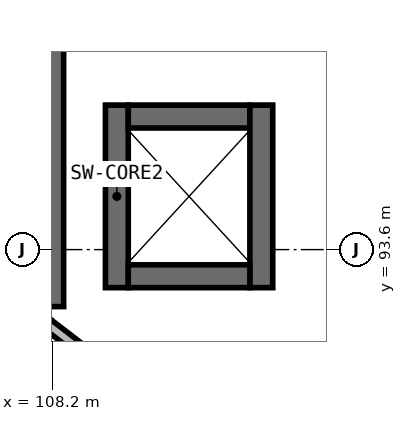
"""IFC4 building model, lengths in metres.
Left out: names, types, materials, properties, quantities, classifications, styles, units other than length and angle.
Written with IfcOpenShell. Run it as: python <this file> out.ifc"""

import sys

from ifc_helpers import new_model, si_unit, direction, frame, frame_2d, origin, place, context, subcontext, project, spatial, rectangle, extrude, element, save


model = new_model("IFC4")
c1 = context("Model", 3, precision=1e-05, world=origin(), true_north=direction((0.0, 1.0)))
c2 = subcontext(c1, "Body", "Model", "MODEL_VIEW")
j1 = project(units=[si_unit("LENGTHUNIT", "METRE"), si_unit("PLANEANGLEUNIT", "RADIAN")], contexts=[c1])
p1 = place(None, origin())
s1 = spatial("IfcSite", under=j1, at=p1, CompositionType="ELEMENT")
p2 = place(p1, origin())
s2 = spatial("IfcBuilding", under=s1, at=p2, CompositionType="ELEMENT")
p3 = place(p2, frame((0.0, 0.0, 18.9)))
s3 = spatial("IfcBuildingStorey", under=s2, at=p3, CompositionType="ELEMENT", Elevation=18.9)
p4 = place(p3, frame((108.175, 96.55, 0.0), z_axis=(0.0, 0.0, 1.0), x_axis=(0.0, -1.0, 0.0)))
e1 = element("IfcWall", 1, at=p4, inside=s3, PredefinedType="SHEAR", context=c2, shape_type="SweptSolid", body=[
    extrude(rectangle(XDim=3.7, YDim=0.35, at=frame_2d((1.85, 0.0))), origin(), (0.0, 0.0, 1.0), 4.55),
])
p5 = place(p3, frame((109.05, 93.1, 0.0), z_axis=(0.0, 0.0, 1.0), x_axis=(0.0, 1.0, 0.0)))
e2 = element("IfcWall", 2, at=p5, inside=s3, PredefinedType="SHEAR", context=c2, shape_type="SweptSolid", body=[
    extrude(rectangle(XDim=2.4, YDim=0.3, at=frame_2d((1.2, 0.0))), origin(), (0.0, 0.0, 1.0), 4.37),
])
p6 = place(p3, frame((109.2, 95.35, 0.0), z_axis=(0.0, 0.0, 1.0), x_axis=(1.0, 0.0, 0.0)))
e3 = element("IfcWall", 3, at=p6, inside=s3, PredefinedType="SHEAR", context=c2, shape_type="SweptSolid", body=[
    extrude(rectangle(XDim=1.6, YDim=0.3, at=frame_2d((0.8, 0.0))), origin(), (0.0, 0.0, 1.0), 4.37),
])
p7 = place(p3, frame((110.95, 95.5, 0.0), z_axis=(0.0, 0.0, 1.0), x_axis=(0.0, -1.0, 0.0)))
e4 = element("IfcWall", 4, at=p7, inside=s3, PredefinedType="SHEAR", context=c2, shape_type="SweptSolid", body=[
    extrude(rectangle(XDim=2.4, YDim=0.3, at=frame_2d((1.2, 0.0))), origin(), (0.0, 0.0, 1.0), 4.37),
])
p8 = place(p3, frame((110.8, 93.25, 0.0), z_axis=(0.0, 0.0, 1.0), x_axis=(-1.0, 0.0, 0.0)))
e5 = element("IfcWall", 5, at=p8, inside=s3, PredefinedType="SHEAR", context=c2, shape_type="SweptSolid", body=[
    extrude(rectangle(XDim=1.6, YDim=0.3, at=frame_2d((0.8, 0.0))), origin(), (0.0, 0.0, 1.0), 4.37),
])
p9 = place(p3, frame((111.675, 98.726, 0.0), z_axis=(0.0, 0.0, 1.0), x_axis=(0.79334001117, -0.608778799465, 0.0)))
e6 = element("IfcWall", 6, at=p9, inside=s3, PredefinedType="SOLIDWALL", context=c2, shape_type="SweptSolid", body=[
    extrude(rectangle(XDim=12.868, YDim=0.29, at=frame_2d((6.434, 0.0))), origin(), (0.0, 0.0, 1.0), 3.754),
])
p10 = place(p9, frame((2.087, 0.0, 0.95)))
e7 = element("IfcOpeningElement", 7, at=p10, cuts=e6, PredefinedType="OPENING", context=c2, shape_type="SweptSolid", body=[
    extrude(rectangle(XDim=2.26, YDim=1.65, at=frame_2d((1.13, 0.825))), frame((0.0, 0.155, 0.0), z_axis=(0.0, -1.0, 0.0), x_axis=(1.0, 0.0, 0.0)), (0.0, 0.0, 1.0), 0.31),
])
p11 = place(p9, frame((8.521, 0.0, 0.95)))
e8 = element("IfcOpeningElement", 8, at=p11, cuts=e6, PredefinedType="OPENING", context=c2, shape_type="SweptSolid", body=[
    extrude(rectangle(XDim=2.26, YDim=1.65, at=frame_2d((1.13, 0.825))), frame((0.0, 0.155, 0.0), z_axis=(0.0, -1.0, 0.0), x_axis=(1.0, 0.0, 0.0)), (0.0, 0.0, 1.0), 0.31),
])
p12 = place(p3, frame((116.896, 85.896, 0.0), z_axis=(0.0, 0.0, 1.0), x_axis=(-0.793301872689, 0.608828497024, 0.0)))
e9 = element("IfcWall", 9, at=p12, inside=s3, PredefinedType="PARTITIONING", context=c2, shape_type="SweptSolid", body=[
    extrude(rectangle(XDim=11.038, YDim=0.15, at=frame_2d((5.519, 0.0))), origin(), (0.0, 0.0, 1.0), 3.676),
])
p13 = place(p12, frame((4.95, 0.0, 0.0)))
e10 = element("IfcOpeningElement", 10, at=p13, cuts=e9, PredefinedType="OPENING", context=c2, shape_type="SweptSolid", body=[
    extrude(rectangle(XDim=1.1, YDim=2.2, at=frame_2d((0.55, 1.1))), frame((0.0, 0.085, 0.0), z_axis=(0.0, -1.0, 0.0), x_axis=(1.0, 0.0, 0.0)), (0.0, 0.0, 1.0), 0.17),
])
save(model, sys.argv[1])
